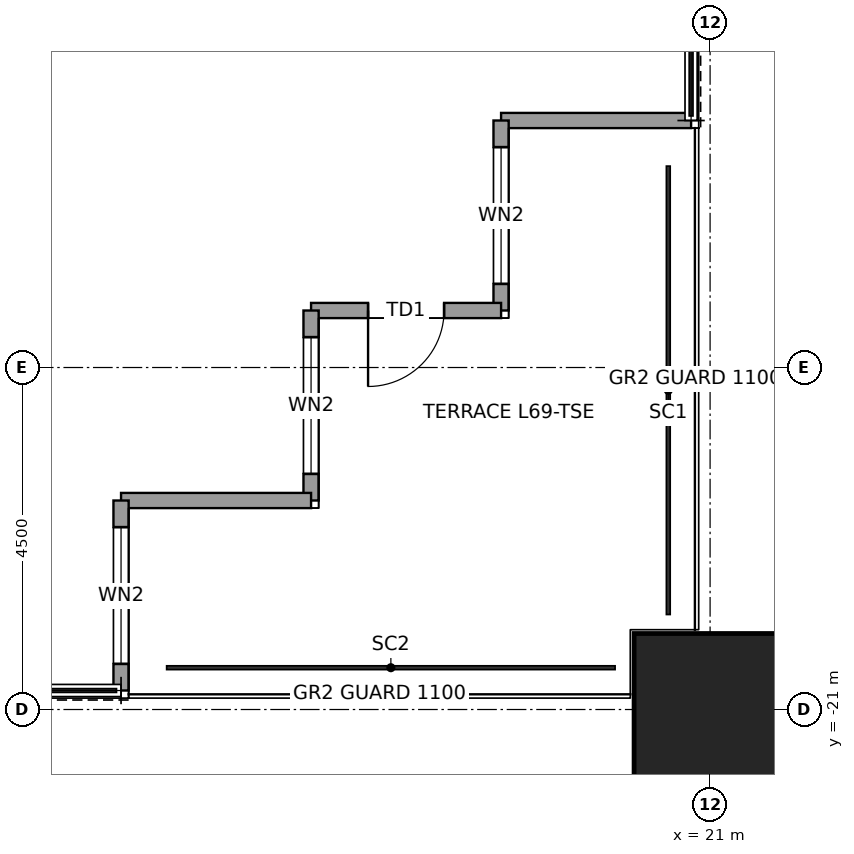
"""IFC4 building model, lengths in metres.
Left out: names, types, materials, properties, quantities, classifications, styles, units other than length and angle.
Written with IfcOpenShell. Run it as: python <this file> out.ifc"""

import sys

from ifc_helpers import new_model, si_unit, direction, frame, frame_2d, origin, origin_2d, place, context, subcontext, project, spatial, rectangle, hollow_rectangle, extrude, element, fill, save


model = new_model("IFC4")
c1 = context("Model", 3, precision=1e-05, world=origin(), true_north=direction((0.0, 1.0)))
c2 = subcontext(c1, "Body", "Model", "MODEL_VIEW")
j1 = project(units=[si_unit("LENGTHUNIT", "METRE"), si_unit("PLANEANGLEUNIT", "RADIAN")], contexts=[c1])
p1 = place(None, origin())
s1 = spatial("IfcSite", under=j1, at=p1, CompositionType="ELEMENT")
p2 = place(p1, origin())
s2 = spatial("IfcBuilding", under=s1, at=p2, CompositionType="ELEMENT")
p3 = place(p2, frame((0.0, 0.0, 311.9)))
s3 = spatial("IfcBuildingStorey", under=s2, at=p3, CompositionType="ELEMENT", Elevation=311.9)
p4 = place(p3, frame((21.0, -21.0, 0.0), z_axis=(0.0, 0.0, 1.0), x_axis=(1.0, 0.0, 0.0)))
e1 = element("IfcColumn", 1, at=p4, inside=s3, PredefinedType="COLUMN", context=c2, shape_type="SweptSolid", body=[
    extrude(hollow_rectangle(XDim=2.0, YDim=2.0, WallThickness=0.095, at=origin_2d()), origin(), (0.0, 0.0, 1.0), 4.0),
])
p5 = place(p3, frame((20.75, -13.25, 0.0), z_axis=(0.0, 0.0, 1.0), x_axis=(-1.0, 0.0, 0.0)))
e2 = element("IfcWall", 2, at=p5, inside=s3, PredefinedType="SOLIDWALL", context=c2, shape_type="SweptSolid", body=[
    extrude(rectangle(XDim=2.5, YDim=0.2, at=frame_2d((1.25, 0.0))), origin(), (0.0, 0.0, 1.0), 3.85),
])
p6 = place(p3, frame((18.25, -13.25, 0.0), z_axis=(0.0, 0.0, 1.0), x_axis=(0.0, -1.0, 0.0)))
e3 = element("IfcWall", 3, at=p6, inside=s3, PredefinedType="SOLIDWALL", context=c2, shape_type="SweptSolid", body=[
    extrude(rectangle(XDim=2.5, YDim=0.2, at=frame_2d((1.25, 0.0))), origin(), (0.0, 0.0, 1.0), 3.85),
])
p7 = place(p6, frame((0.35, 0.0, 0.3)))
e4 = element("IfcOpeningElement", 4, at=p7, cuts=e3, PredefinedType="OPENING", context=c2, shape_type="SweptSolid", body=[
    extrude(rectangle(XDim=1.8, YDim=2.4, at=frame_2d((0.9, 1.2))), frame((0.0, 0.11, 0.0), z_axis=(0.0, -1.0, 0.0), x_axis=(1.0, 0.0, 0.0)), (0.0, 0.0, 1.0), 0.22),
])
p8 = place(p3, frame((18.25, -15.75, 0.0), z_axis=(0.0, 0.0, 1.0), x_axis=(-1.0, 0.0, 0.0)))
e5 = element("IfcWall", 5, at=p8, inside=s3, PredefinedType="SOLIDWALL", context=c2, shape_type="SweptSolid", body=[
    extrude(rectangle(XDim=2.5, YDim=0.2, at=frame_2d((1.25, 0.0))), origin(), (0.0, 0.0, 1.0), 3.317),
])
p9 = place(p8, frame((0.75, 0.0, 0.0)))
e6 = element("IfcOpeningElement", 6, at=p9, cuts=e5, PredefinedType="OPENING", context=c2, shape_type="SweptSolid", body=[
    extrude(rectangle(XDim=1.0, YDim=2.4, at=frame_2d((0.5, 1.2))), frame((0.0, 0.11, 0.0), z_axis=(0.0, -1.0, 0.0), x_axis=(1.0, 0.0, 0.0)), (0.0, 0.0, 1.0), 0.22),
])
p10 = place(p3, frame((15.75, -15.75, 0.0), z_axis=(0.0, 0.0, 1.0), x_axis=(0.0, -1.0, 0.0)))
e7 = element("IfcWall", 7, at=p10, inside=s3, PredefinedType="SOLIDWALL", context=c2, shape_type="SweptSolid", body=[
    extrude(rectangle(XDim=2.5, YDim=0.2, at=frame_2d((1.25, 0.0))), origin(), (0.0, 0.0, 1.0), 3.85),
])
p11 = place(p10, frame((0.35, 0.0, 0.3)))
e8 = element("IfcOpeningElement", 8, at=p11, cuts=e7, PredefinedType="OPENING", context=c2, shape_type="SweptSolid", body=[
    extrude(rectangle(XDim=1.8, YDim=2.4, at=frame_2d((0.9, 1.2))), frame((0.0, 0.11, 0.0), z_axis=(0.0, -1.0, 0.0), x_axis=(1.0, 0.0, 0.0)), (0.0, 0.0, 1.0), 0.22),
])
p12 = place(p3, frame((15.75, -18.25, 0.0), z_axis=(0.0, 0.0, 1.0), x_axis=(-1.0, 0.0, 0.0)))
e9 = element("IfcWall", 9, at=p12, inside=s3, PredefinedType="SOLIDWALL", context=c2, shape_type="SweptSolid", body=[
    extrude(rectangle(XDim=2.5, YDim=0.2, at=frame_2d((1.25, 0.0))), origin(), (0.0, 0.0, 1.0), 3.85),
])
p13 = place(p3, frame((13.25, -18.25, 0.0), z_axis=(0.0, 0.0, 1.0), x_axis=(0.0, -1.0, 0.0)))
e10 = element("IfcWall", 10, at=p13, inside=s3, PredefinedType="SOLIDWALL", context=c2, shape_type="SweptSolid", body=[
    extrude(rectangle(XDim=2.5, YDim=0.2, at=frame_2d((1.25, 0.0))), origin(), (0.0, 0.0, 1.0), 3.85),
])
p14 = place(p13, frame((0.35, 0.0, 0.3)))
e11 = element("IfcOpeningElement", 11, at=p14, cuts=e10, PredefinedType="OPENING", context=c2, shape_type="SweptSolid", body=[
    extrude(rectangle(XDim=1.8, YDim=2.4, at=frame_2d((0.9, 1.2))), frame((0.0, 0.11, 0.0), z_axis=(0.0, -1.0, 0.0), x_axis=(1.0, 0.0, 0.0)), (0.0, 0.0, 1.0), 0.22),
])
p15 = place(p7, origin())
e12 = element("IfcWindow", 12, at=p15, inside=s3, PartitioningType="SINGLE_PANEL", PredefinedType="WINDOW", context=c2, shape_type="SweptSolid", body=[
    extrude(rectangle(XDim=1.8, YDim=2.4, at=frame_2d((0.9, 1.2))), frame((0.0, 0.03, 0.0), z_axis=(0.0, -1.0, 0.0), x_axis=(1.0, 0.0, 0.0)), (0.0, 0.0, 1.0), 0.06),
])
fill(e4, e12)
p16 = place(p9, origin())
e13 = element("IfcDoor", 13, at=p16, inside=s3, OperationType="SINGLE_SWING_RIGHT", PredefinedType="DOOR", context=c2, shape_type="SweptSolid", body=[
    extrude(rectangle(XDim=1.0, YDim=2.4, at=frame_2d((0.5, 1.2))), frame((0.0, 0.025, 0.0), z_axis=(0.0, -1.0, 0.0), x_axis=(1.0, 0.0, 0.0)), (0.0, 0.0, 1.0), 0.05),
])
fill(e6, e13)
p17 = place(p11, origin())
e14 = element("IfcWindow", 14, at=p17, inside=s3, PartitioningType="SINGLE_PANEL", PredefinedType="WINDOW", context=c2, shape_type="SweptSolid", body=[
    extrude(rectangle(XDim=1.8, YDim=2.4, at=frame_2d((0.9, 1.2))), frame((0.0, 0.03, 0.0), z_axis=(0.0, -1.0, 0.0), x_axis=(1.0, 0.0, 0.0)), (0.0, 0.0, 1.0), 0.06),
])
fill(e8, e14)
p18 = place(p14, origin())
e15 = element("IfcWindow", 15, at=p18, inside=s3, PartitioningType="SINGLE_PANEL", PredefinedType="WINDOW", context=c2, shape_type="SweptSolid", body=[
    extrude(rectangle(XDim=1.8, YDim=2.4, at=frame_2d((0.9, 1.2))), frame((0.0, 0.03, 0.0), z_axis=(0.0, -1.0, 0.0), x_axis=(1.0, 0.0, 0.0)), (0.0, 0.0, 1.0), 0.06),
])
fill(e11, e15)
save(model, sys.argv[1])
